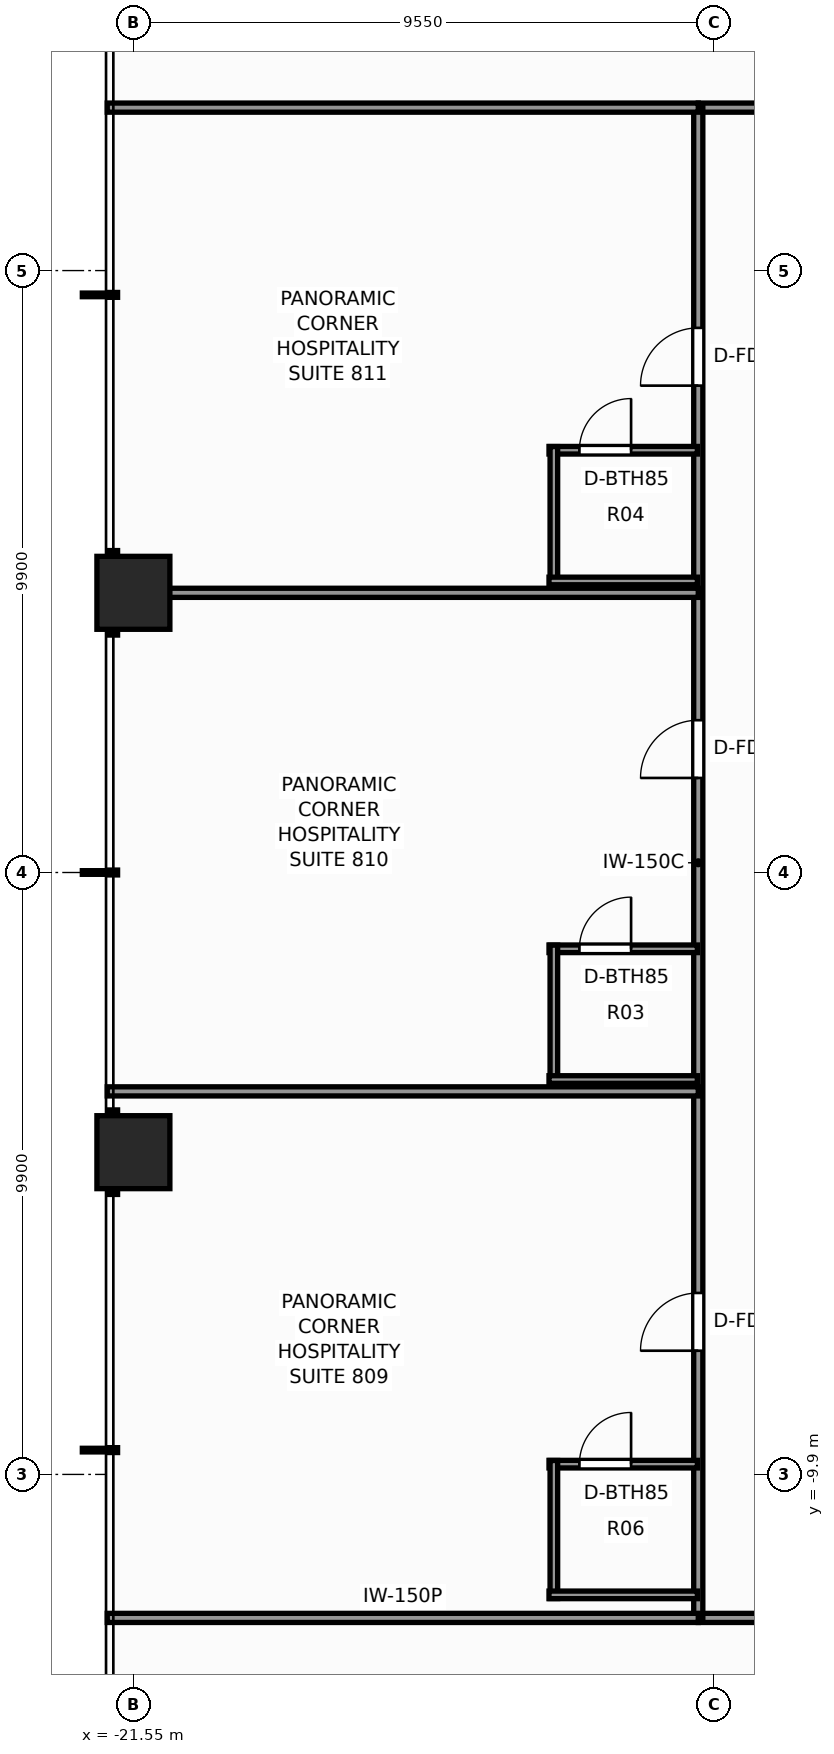
"""IFC4 building model, lengths in metres.
Left out: names, types, materials, properties, quantities, classifications, styles, units other than length and angle.
Written with IfcOpenShell. Run it as: python <this file> out.ifc"""

import sys

from ifc_helpers import new_model, si_unit, direction, frame, frame_2d, origin, origin_2d, place, context, subcontext, project, spatial, rectangle, extrude, element, fill, save


model = new_model("IFC4")
c1 = context("Model", 3, precision=1e-05, world=origin(), true_north=direction((0.0, 1.0)))
c2 = subcontext(c1, "Body", "Model", "MODEL_VIEW")
j1 = project(units=[si_unit("LENGTHUNIT", "METRE"), si_unit("PLANEANGLEUNIT", "RADIAN")], contexts=[c1])
p1 = place(None, origin())
s1 = spatial("IfcSite", under=j1, at=p1, CompositionType="ELEMENT")
p2 = place(p1, origin())
s2 = spatial("IfcBuilding", under=s1, at=p2, CompositionType="ELEMENT")
p3 = place(p2, frame((0.0, 0.0, 30.4)))
s3 = spatial("IfcBuildingStorey", under=s2, at=p3, CompositionType="ELEMENT", Elevation=30.4)
for number, where, z_axis, x_axis in (
    (1, (-21.55, -4.6, 0.0), (0.0, 0.0, 1.0), (1.0, 0.0, 0.0)),
    (2, (-21.55, 4.6, 0.0), (0.0, 0.0, 1.0), (1.0, 0.0, 0.0)),
):
    element("IfcColumn", number, at=place(p3, frame(where, z_axis=z_axis, x_axis=x_axis)), inside=s3, PredefinedType="COLUMN", context=c2, shape_type="SweptSolid", body=[
        extrude(rectangle(XDim=1.2, YDim=1.2, at=origin_2d()), origin(), (0.0, 0.0, 1.0), 3.3),
    ])
p4 = place(p3, frame((-12.26, -12.26, 0.0), z_axis=(0.0, 0.0, 1.0), x_axis=(1.0, 0.0, 0.0)))
e3 = element("IfcWall", 3, at=p4, inside=s3, PredefinedType="PARTITIONING", context=c2, shape_type="SweptSolid", body=[
    extrude(rectangle(XDim=24.68, YDim=0.15, at=frame_2d((12.34, 0.0))), origin(), (0.0, 0.0, 1.0), 2.272),
])
p5 = place(p4, frame((3.444, 0.0, 0.0)))
e4 = element("IfcOpeningElement", 4, at=p5, cuts=e3, PredefinedType="OPENING", context=c2, shape_type="SweptSolid", body=[
    extrude(rectangle(XDim=0.9, YDim=2.06, at=frame_2d((0.45, 1.03))), frame((0.0, 0.085, 0.0), z_axis=(0.0, -1.0, 0.0), x_axis=(1.0, 0.0, 0.0)), (0.0, 0.0, 1.0), 0.17),
])
p6 = place(p4, frame((5.779, 0.0, 0.0)))
e5 = element("IfcOpeningElement", 5, at=p6, cuts=e3, PredefinedType="OPENING", context=c2, shape_type="SweptSolid", body=[
    extrude(rectangle(XDim=0.9, YDim=2.06, at=frame_2d((0.45, 1.03))), frame((0.0, 0.085, 0.0), z_axis=(0.0, -1.0, 0.0), x_axis=(1.0, 0.0, 0.0)), (0.0, 0.0, 1.0), 0.17),
])
p7 = place(p4, frame((13.551, 0.0, 0.0)))
e6 = element("IfcOpeningElement", 6, at=p7, cuts=e3, PredefinedType="OPENING", context=c2, shape_type="SweptSolid", body=[
    extrude(rectangle(XDim=0.9, YDim=2.06, at=frame_2d((0.45, 1.03))), frame((0.0, 0.085, 0.0), z_axis=(0.0, -1.0, 0.0), x_axis=(1.0, 0.0, 0.0)), (0.0, 0.0, 1.0), 0.17),
])
p8 = place(p4, frame((17.921, 0.0, 0.0)))
e7 = element("IfcOpeningElement", 7, at=p8, cuts=e3, PredefinedType="OPENING", context=c2, shape_type="SweptSolid", body=[
    extrude(rectangle(XDim=0.9, YDim=2.06, at=frame_2d((0.45, 1.03))), frame((0.0, 0.085, 0.0), z_axis=(0.0, -1.0, 0.0), x_axis=(1.0, 0.0, 0.0)), (0.0, 0.0, 1.0), 0.17),
])
p9 = place(p4, frame((20.256, 0.0, 0.0)))
e8 = element("IfcOpeningElement", 8, at=p9, cuts=e3, PredefinedType="OPENING", context=c2, shape_type="SweptSolid", body=[
    extrude(rectangle(XDim=0.9, YDim=2.06, at=frame_2d((0.45, 1.03))), frame((0.0, 0.085, 0.0), z_axis=(0.0, -1.0, 0.0), x_axis=(1.0, 0.0, 0.0)), (0.0, 0.0, 1.0), 0.17),
])
p10 = place(p3, frame((-12.26, 12.58, 0.0), z_axis=(0.0, 0.0, 1.0), x_axis=(1.0, 0.0, 0.0)))
e9 = element("IfcWall", 9, at=p10, inside=s3, PredefinedType="PARTITIONING", context=c2, shape_type="SweptSolid", body=[
    extrude(rectangle(XDim=24.68, YDim=0.15, at=frame_2d((12.34, 0.0))), origin(), (0.0, 0.0, 1.0), 2.272),
])
p11 = place(p10, frame((3.444, 0.0, 0.0)))
e10 = element("IfcOpeningElement", 10, at=p11, cuts=e9, PredefinedType="OPENING", context=c2, shape_type="SweptSolid", body=[
    extrude(rectangle(XDim=0.9, YDim=2.06, at=frame_2d((0.45, 1.03))), frame((0.0, 0.085, 0.0), z_axis=(0.0, -1.0, 0.0), x_axis=(1.0, 0.0, 0.0)), (0.0, 0.0, 1.0), 0.17),
])
p12 = place(p10, frame((9.78, 0.0, 0.0)))
e11 = element("IfcOpeningElement", 11, at=p12, cuts=e9, PredefinedType="OPENING", context=c2, shape_type="SweptSolid", body=[
    extrude(rectangle(XDim=0.9, YDim=2.06, at=frame_2d((0.45, 1.03))), frame((0.0, 0.085, 0.0), z_axis=(0.0, -1.0, 0.0), x_axis=(1.0, 0.0, 0.0)), (0.0, 0.0, 1.0), 0.17),
])
p13 = place(p10, frame((19.345, 0.0, 0.0)))
e12 = element("IfcOpeningElement", 12, at=p13, cuts=e9, PredefinedType="OPENING", context=c2, shape_type="SweptSolid", body=[
    extrude(rectangle(XDim=0.9, YDim=2.06, at=frame_2d((0.45, 1.03))), frame((0.0, 0.085, 0.0), z_axis=(0.0, -1.0, 0.0), x_axis=(1.0, 0.0, 0.0)), (0.0, 0.0, 1.0), 0.17),
])
p14 = place(p3, frame((-12.26, -12.26, 0.0), z_axis=(0.0, 0.0, 1.0), x_axis=(0.0, 1.0, 0.0)))
e13 = element("IfcWall", 13, at=p14, inside=s3, PredefinedType="PARTITIONING", context=c2, shape_type="SweptSolid", body=[
    extrude(rectangle(XDim=24.84, YDim=0.15, at=frame_2d((12.42, 0.0))), origin(), (0.0, 0.0, 1.0), 2.272),
])
p15 = place(p14, frame((4.395, 0.0, 0.0)))
e14 = element("IfcOpeningElement", 14, at=p15, cuts=e13, PredefinedType="OPENING", context=c2, shape_type="SweptSolid", body=[
    extrude(rectangle(XDim=0.95, YDim=2.06, at=frame_2d((0.475, 1.03))), frame((0.0, 0.085, 0.0), z_axis=(0.0, -1.0, 0.0), x_axis=(1.0, 0.0, 0.0)), (0.0, 0.0, 1.0), 0.17),
])
p16 = place(p14, frame((13.815, 0.0, 0.0)))
e15 = element("IfcOpeningElement", 15, at=p16, cuts=e13, PredefinedType="OPENING", context=c2, shape_type="SweptSolid", body=[
    extrude(rectangle(XDim=0.95, YDim=2.06, at=frame_2d((0.475, 1.03))), frame((0.0, 0.085, 0.0), z_axis=(0.0, -1.0, 0.0), x_axis=(1.0, 0.0, 0.0)), (0.0, 0.0, 1.0), 0.17),
])
p17 = place(p14, frame((20.268, 0.0, 0.0)))
e16 = element("IfcOpeningElement", 16, at=p17, cuts=e13, PredefinedType="OPENING", context=c2, shape_type="SweptSolid", body=[
    extrude(rectangle(XDim=0.95, YDim=2.06, at=frame_2d((0.475, 1.03))), frame((0.0, 0.085, 0.0), z_axis=(0.0, -1.0, 0.0), x_axis=(1.0, 0.0, 0.0)), (0.0, 0.0, 1.0), 0.17),
])
for number, where, z_axis, x_axis in (
    (17, (-21.98, -12.26, 0.0), (0.0, 0.0, 1.0), (1.0, 0.0, 0.0)),
    (18, (-21.98, 12.58, 0.0), (0.0, 0.0, 1.0), (1.0, 0.0, 0.0)),
):
    element("IfcWall", number, at=place(p3, frame(where, z_axis=z_axis, x_axis=x_axis)), inside=s3, PredefinedType="PARTITIONING", context=c2, shape_type="SweptSolid", body=[
        extrude(rectangle(XDim=9.72, YDim=0.15, at=frame_2d((4.86, 0.0))), origin(), (0.0, 0.0, 1.0), 2.272),
    ])
p18 = place(p3, frame((-21.98, -3.6, 0.0), z_axis=(0.0, 0.0, 1.0), x_axis=(1.0, 0.0, 0.0)))
e19 = element("IfcWall", 19, at=p18, inside=s3, PredefinedType="PARTITIONING", context=c2, shape_type="SweptSolid", body=[
    extrude(rectangle(XDim=9.72, YDim=0.15, at=frame_2d((4.86, 0.0))), origin(), (0.0, 0.0, 1.0), 2.429),
])
p19 = place(p3, frame((-14.715, -9.731, 0.0), z_axis=(0.0, 0.0, 1.0), x_axis=(1.0, 0.0, 0.0)))
e20 = element("IfcWall", 20, at=p19, inside=s3, PredefinedType="PARTITIONING", context=c2, shape_type="SweptSolid", body=[
    extrude(rectangle(XDim=2.44, YDim=0.125, at=frame_2d((1.22, 0.0))), origin(), (0.0, 0.0, 1.0), 3.06),
])
p20 = place(p19, frame((0.5, 0.0, 0.0)))
e21 = element("IfcOpeningElement", 21, at=p20, cuts=e20, PredefinedType="OPENING", context=c2, shape_type="SweptSolid", body=[
    extrude(rectangle(XDim=0.85, YDim=2.03, at=frame_2d((0.425, 1.015))), frame((0.0, 0.073, 0.0), z_axis=(0.0, -1.0, 0.0), x_axis=(1.0, 0.0, 0.0)), (0.0, 0.0, 1.0), 0.145),
])
p21 = place(p3, frame((-14.635, -11.941, 0.0), z_axis=(0.0, 0.0, 1.0), x_axis=(0.0, 1.0, 0.0)))
e22 = element("IfcWall", 22, at=p21, inside=s3, PredefinedType="PARTITIONING", context=c2, shape_type="SweptSolid", body=[
    extrude(rectangle(XDim=2.27, YDim=0.125, at=frame_2d((1.135, 0.0))), origin(), (0.0, 0.0, 1.0), 2.272),
])
p22 = place(p3, frame((-14.715, -11.881, 0.0), z_axis=(0.0, 0.0, 1.0), x_axis=(1.0, 0.0, 0.0)))
e23 = element("IfcWall", 23, at=p22, inside=s3, PredefinedType="PARTITIONING", context=c2, shape_type="SweptSolid", body=[
    extrude(rectangle(XDim=2.44, YDim=0.125, at=frame_2d((1.22, 0.0))), origin(), (0.0, 0.0, 1.0), 2.272),
])
p23 = place(p3, frame((-21.98, 4.6, 0.0), z_axis=(0.0, 0.0, 1.0), x_axis=(1.0, 0.0, 0.0)))
e24 = element("IfcWall", 24, at=p23, inside=s3, PredefinedType="PARTITIONING", context=c2, shape_type="SweptSolid", body=[
    extrude(rectangle(XDim=9.72, YDim=0.15, at=frame_2d((4.86, 0.0))), origin(), (0.0, 0.0, 1.0), 2.272),
])
p24 = place(p3, frame((-14.715, -1.255, 0.0), z_axis=(0.0, 0.0, 1.0), x_axis=(1.0, 0.0, 0.0)))
e25 = element("IfcWall", 25, at=p24, inside=s3, PredefinedType="PARTITIONING", context=c2, shape_type="SweptSolid", body=[
    extrude(rectangle(XDim=2.44, YDim=0.125, at=frame_2d((1.22, 0.0))), origin(), (0.0, 0.0, 1.0), 3.06),
])
p25 = place(p24, frame((0.5, 0.0, 0.0)))
e26 = element("IfcOpeningElement", 26, at=p25, cuts=e25, PredefinedType="OPENING", context=c2, shape_type="SweptSolid", body=[
    extrude(rectangle(XDim=0.85, YDim=2.03, at=frame_2d((0.425, 1.015))), frame((0.0, 0.073, 0.0), z_axis=(0.0, -1.0, 0.0), x_axis=(1.0, 0.0, 0.0)), (0.0, 0.0, 1.0), 0.145),
])
p26 = place(p3, frame((-14.635, -3.465, 0.0), z_axis=(0.0, 0.0, 1.0), x_axis=(0.0, 1.0, 0.0)))
e27 = element("IfcWall", 27, at=p26, inside=s3, PredefinedType="PARTITIONING", context=c2, shape_type="SweptSolid", body=[
    extrude(rectangle(XDim=2.27, YDim=0.125, at=frame_2d((1.135, 0.0))), origin(), (0.0, 0.0, 1.0), 2.349),
])
p27 = place(p3, frame((-14.715, -3.405, 0.0), z_axis=(0.0, 0.0, 1.0), x_axis=(1.0, 0.0, 0.0)))
e28 = element("IfcWall", 28, at=p27, inside=s3, PredefinedType="PARTITIONING", context=c2, shape_type="SweptSolid", body=[
    extrude(rectangle(XDim=2.44, YDim=0.125, at=frame_2d((1.22, 0.0))), origin(), (0.0, 0.0, 1.0), 3.06),
])
p28 = place(p3, frame((-14.715, 6.945, 0.0), z_axis=(0.0, 0.0, 1.0), x_axis=(1.0, 0.0, 0.0)))
e29 = element("IfcWall", 29, at=p28, inside=s3, PredefinedType="PARTITIONING", context=c2, shape_type="SweptSolid", body=[
    extrude(rectangle(XDim=2.44, YDim=0.125, at=frame_2d((1.22, 0.0))), origin(), (0.0, 0.0, 1.0), 3.06),
])
p29 = place(p28, frame((0.5, 0.0, 0.0)))
e30 = element("IfcOpeningElement", 30, at=p29, cuts=e29, PredefinedType="OPENING", context=c2, shape_type="SweptSolid", body=[
    extrude(rectangle(XDim=0.85, YDim=2.03, at=frame_2d((0.425, 1.015))), frame((0.0, 0.073, 0.0), z_axis=(0.0, -1.0, 0.0), x_axis=(1.0, 0.0, 0.0)), (0.0, 0.0, 1.0), 0.145),
])
p30 = place(p3, frame((-14.635, 4.735, 0.0), z_axis=(0.0, 0.0, 1.0), x_axis=(0.0, 1.0, 0.0)))
e31 = element("IfcWall", 31, at=p30, inside=s3, PredefinedType="PARTITIONING", context=c2, shape_type="SweptSolid", body=[
    extrude(rectangle(XDim=2.27, YDim=0.125, at=frame_2d((1.135, 0.0))), origin(), (0.0, 0.0, 1.0), 2.272),
])
p31 = place(p3, frame((-14.715, 4.795, 0.0), z_axis=(0.0, 0.0, 1.0), x_axis=(1.0, 0.0, 0.0)))
e32 = element("IfcWall", 32, at=p31, inside=s3, PredefinedType="PARTITIONING", context=c2, shape_type="SweptSolid", body=[
    extrude(rectangle(XDim=2.44, YDim=0.125, at=frame_2d((1.22, 0.0))), origin(), (0.0, 0.0, 1.0), 2.272),
])
p32 = place(p20, origin())
e33 = element("IfcDoor", 33, at=p32, inside=s3, OperationType="SINGLE_SWING_RIGHT", PredefinedType="DOOR", context=c2, shape_type="SweptSolid", body=[
    extrude(rectangle(XDim=0.85, YDim=2.03, at=frame_2d((0.425, 1.015))), frame((0.0, 0.025, 0.0), z_axis=(0.0, -1.0, 0.0), x_axis=(1.0, 0.0, 0.0)), (0.0, 0.0, 1.0), 0.05),
])
fill(e21, e33)
p33 = place(p15, origin())
e34 = element("IfcDoor", 34, at=p33, inside=s3, OperationType="SINGLE_SWING_LEFT", PredefinedType="DOOR", context=c2, shape_type="SweptSolid", body=[
    extrude(rectangle(XDim=0.95, YDim=2.06, at=frame_2d((0.475, 1.03))), frame((0.0, 0.025, 0.0), z_axis=(0.0, -1.0, 0.0), x_axis=(1.0, 0.0, 0.0)), (0.0, 0.0, 1.0), 0.05),
])
fill(e14, e34)
p34 = place(p25, origin())
e35 = element("IfcDoor", 35, at=p34, inside=s3, OperationType="SINGLE_SWING_RIGHT", PredefinedType="DOOR", context=c2, shape_type="SweptSolid", body=[
    extrude(rectangle(XDim=0.85, YDim=2.03, at=frame_2d((0.425, 1.015))), frame((0.0, 0.025, 0.0), z_axis=(0.0, -1.0, 0.0), x_axis=(1.0, 0.0, 0.0)), (0.0, 0.0, 1.0), 0.05),
])
fill(e26, e35)
p35 = place(p16, origin())
e36 = element("IfcDoor", 36, at=p35, inside=s3, OperationType="SINGLE_SWING_LEFT", PredefinedType="DOOR", context=c2, shape_type="SweptSolid", body=[
    extrude(rectangle(XDim=0.95, YDim=2.06, at=frame_2d((0.475, 1.03))), frame((0.0, 0.025, 0.0), z_axis=(0.0, -1.0, 0.0), x_axis=(1.0, 0.0, 0.0)), (0.0, 0.0, 1.0), 0.05),
])
fill(e15, e36)
p36 = place(p29, origin())
e37 = element("IfcDoor", 37, at=p36, inside=s3, OperationType="SINGLE_SWING_RIGHT", PredefinedType="DOOR", context=c2, shape_type="SweptSolid", body=[
    extrude(rectangle(XDim=0.85, YDim=2.03, at=frame_2d((0.425, 1.015))), frame((0.0, 0.025, 0.0), z_axis=(0.0, -1.0, 0.0), x_axis=(1.0, 0.0, 0.0)), (0.0, 0.0, 1.0), 0.05),
])
fill(e30, e37)
p37 = place(p17, origin())
e38 = element("IfcDoor", 38, at=p37, inside=s3, OperationType="SINGLE_SWING_LEFT", PredefinedType="DOOR", context=c2, shape_type="SweptSolid", body=[
    extrude(rectangle(XDim=0.95, YDim=2.06, at=frame_2d((0.475, 1.03))), frame((0.0, 0.025, 0.0), z_axis=(0.0, -1.0, 0.0), x_axis=(1.0, 0.0, 0.0)), (0.0, 0.0, 1.0), 0.05),
])
fill(e16, e38)
save(model, sys.argv[1])
